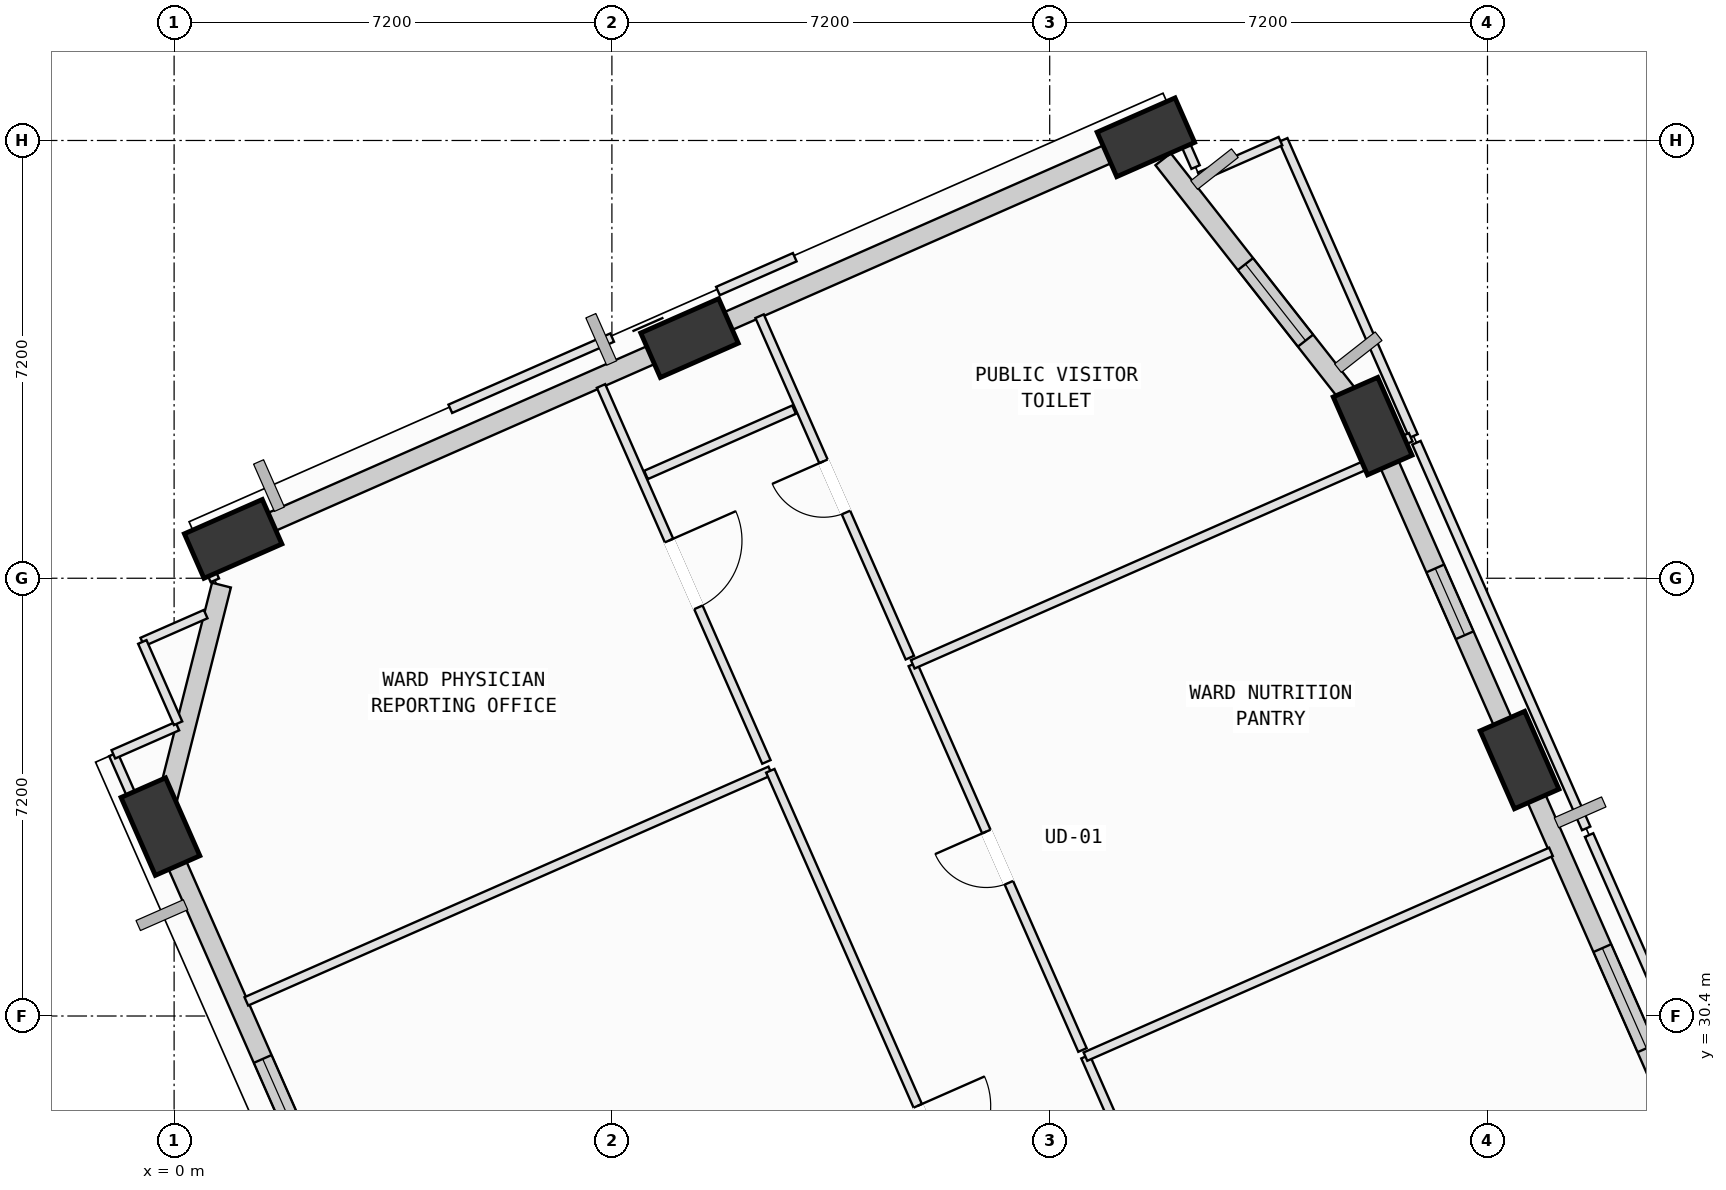
"""IFC4 building model, lengths in metres.
Left out: names, types, materials, properties, quantities, classifications, styles, units other than length and angle.
Written with IfcOpenShell. Run it as: python <this file> out.ifc"""

import sys

from ifc_helpers import new_model, si_unit, direction, frame, frame_2d, origin, origin_2d, place, context, subcontext, project, spatial, rectangle, extrude, element, fill, save


model = new_model("IFC4")
c1 = context("Model", 3, precision=1e-05, world=origin(), true_north=direction((0.0, 1.0)))
c2 = subcontext(c1, "Body", "Model", "MODEL_VIEW")
j1 = project(units=[si_unit("LENGTHUNIT", "METRE"), si_unit("PLANEANGLEUNIT", "RADIAN")], contexts=[c1])
p1 = place(None, origin())
s1 = spatial("IfcSite", under=j1, at=p1, CompositionType="ELEMENT")
p2 = place(p1, origin())
s2 = spatial("IfcBuilding", under=s1, at=p2, CompositionType="ELEMENT")
p3 = place(p2, frame((0.0, 0.0, 124.4)))
s3 = spatial("IfcBuildingStorey", under=s2, at=p3, CompositionType="ELEMENT", Elevation=124.4)
p4 = place(p3, frame((22.127, 34.61, 0.002), z_axis=(-0.040180454618, -0.047801936905, 0.998048348476), x_axis=(0.279502323425, 0.958442212202, 0.057157476053)))
e1 = element("IfcColumn", 1, at=p4, inside=s3, PredefinedType="COLUMN", context=c2, shape_type="SweptSolid", body=[
    extrude(rectangle(XDim=1.4, YDim=0.8, at=origin_2d()), origin(), (0.0, 0.0, 1.0), 4.004),
])
p5 = place(p3, frame((19.711, 40.102, 0.002), z_axis=(-0.0626943162, -0.057885723015, 0.996352681427), x_axis=(0.396835249314, 0.914560833815, 0.078104200608)))
e2 = element("IfcColumn", 2, at=p5, inside=s3, PredefinedType="COLUMN", context=c2, shape_type="SweptSolid", body=[
    extrude(rectangle(XDim=1.4, YDim=0.8, at=origin_2d()), origin(), (0.0, 0.0, 1.0), 4.011),
])
p6 = place(p3, frame((15.982, 44.853, 0.002), z_axis=(-0.082033174961, -0.073289446468, 0.993931192408), x_axis=(0.908341058248, -0.415877043565, 0.044303572491)))
e3 = element("IfcColumn", 3, at=p6, inside=s3, PredefinedType="COLUMN", context=c2, shape_type="SweptSolid", body=[
    extrude(rectangle(XDim=1.4, YDim=0.8, at=origin_2d()), origin(), (0.0, 0.0, 1.0), 4.021),
])
p7 = place(p3, frame((8.476, 41.55, 0.002), z_axis=(-0.068013636446, -0.103899619312, 0.992259549898), x_axis=(0.984695690067, -0.166952204506, 0.050013591895)))
e4 = element("IfcColumn", 4, at=p7, inside=s3, PredefinedType="COLUMN", context=c2, shape_type="SweptSolid", body=[
    extrude(rectangle(XDim=1.4, YDim=0.8, at=origin_2d()), origin(), (0.0, 0.0, 1.0), 4.028),
])
p8 = place(p3, frame((0.971, 38.247, 0.002), z_axis=(-0.05404001338, -0.134314216701, 0.989464182346), x_axis=(0.997904403468, 0.028051460291, 0.058308808203)))
e5 = element("IfcColumn", 5, at=p8, inside=s3, PredefinedType="COLUMN", context=c2, shape_type="SweptSolid", body=[
    extrude(rectangle(XDim=1.4, YDim=0.8, at=origin_2d()), origin(), (0.0, 0.0, 1.0), 4.039),
])
p9 = place(p3, frame((-0.225, 33.515, 0.002), z_axis=(-0.034643865826, -0.139059147293, 0.989677905237), x_axis=(-0.171816784218, 0.976356827789, 0.131172929718)))
e6 = element("IfcColumn", 6, at=p9, inside=s3, PredefinedType="COLUMN", context=c2, shape_type="SweptSolid", body=[
    extrude(rectangle(XDim=1.4, YDim=0.8, at=origin_2d()), origin(), (0.0, 0.0, 1.0), 4.038),
])
p10 = place(p3, frame((22.344, 34.117, 0.0), z_axis=(0.0, 0.0, 1.0), x_axis=(0.402732040275, -0.915317924951, 0.0)))
e7 = element("IfcWall", 7, at=p10, inside=s3, PredefinedType="SOLIDWALL", context=c2, shape_type="SweptSolid", body=[
    extrude(rectangle(XDim=6.223, YDim=0.32, at=frame_2d((3.111, 0.0))), origin(), (0.0, 0.0, 1.0), 3.165),
])
p11 = place(p10, frame((2.841, 0.0, 0.75)))
e8 = element("IfcOpeningElement", 8, at=p11, cuts=e7, PredefinedType="OPENING", context=c2, shape_type="SweptSolid", body=[
    extrude(rectangle(XDim=1.8, YDim=2.05, at=frame_2d((0.9, 1.025))), frame((0.0, 0.17, 0.0), z_axis=(0.0, -1.0, 0.0), x_axis=(1.0, 0.0, 0.0)), (0.0, 0.0, 1.0), 0.34),
])
p12 = place(p3, frame((19.922, 39.622, 0.0), z_axis=(0.0, 0.0, 1.0), x_axis=(0.402751582793, -0.915309326161, 0.0)))
e9 = element("IfcWall", 9, at=p12, inside=s3, PredefinedType="SOLIDWALL", context=c2, shape_type="SweptSolid", body=[
    extrude(rectangle(XDim=5.047, YDim=0.32, at=frame_2d((2.523, 0.0))), origin(), (0.0, 0.0, 1.0), 3.165),
])
p13 = place(p12, frame((2.033, 0.0, 0.75)))
e10 = element("IfcOpeningElement", 10, at=p13, cuts=e9, PredefinedType="OPENING", context=c2, shape_type="SweptSolid", body=[
    extrude(rectangle(XDim=1.2, YDim=1.75, at=frame_2d((0.6, 0.875))), frame((0.0, 0.17, 0.0), z_axis=(0.0, -1.0, 0.0), x_axis=(1.0, 0.0, 0.0)), (0.0, 0.0, 1.0), 0.34),
])
p14 = place(p3, frame((16.265, 44.492, 0.0), z_axis=(0.0, 0.0, 1.0), x_axis=(0.617487208396, -0.78658092239, 0.0)))
e11 = element("IfcWall", 11, at=p14, inside=s3, PredefinedType="SOLIDWALL", context=c2, shape_type="SweptSolid", body=[
    extrude(rectangle(XDim=5.128, YDim=0.32, at=frame_2d((2.564, 0.0))), origin(), (0.0, 0.0, 1.0), 3.165),
])
p15 = place(p14, frame((2.193, 0.0, 0.75)))
e12 = element("IfcOpeningElement", 12, at=p15, cuts=e11, PredefinedType="OPENING", context=c2, shape_type="SweptSolid", body=[
    extrude(rectangle(XDim=1.6, YDim=1.95, at=frame_2d((0.8, 0.975))), frame((0.0, 0.17, 0.0), z_axis=(0.0, -1.0, 0.0), x_axis=(1.0, 0.0, 0.0)), (0.0, 0.0, 1.0), 0.34),
])
p16 = place(p3, frame((8.721, 41.658, 0.0), z_axis=(0.0, 0.0, 1.0), x_axis=(0.915314534558, 0.402739745775, 0.0)))
e13 = element("IfcWall", 13, at=p16, inside=s3, PredefinedType="SOLIDWALL", context=c2, shape_type="SweptSolid", body=[
    extrude(rectangle(XDim=7.231, YDim=0.32, at=frame_2d((3.615, 0.0))), origin(), (0.0, 0.0, 1.0), 3.165),
])
p17 = place(p3, frame((1.193, 38.345, 0.0), z_axis=(0.0, 0.0, 1.0), x_axis=(0.915298195842, 0.402776877052, 0.0)))
e14 = element("IfcWall", 14, at=p17, inside=s3, PredefinedType="SOLIDWALL", context=c2, shape_type="SweptSolid", body=[
    extrude(rectangle(XDim=7.27, YDim=0.32, at=frame_2d((3.635, 0.0))), origin(), (0.0, 0.0, 1.0), 3.165),
])
p18 = place(p3, frame((-0.174, 33.716, 0.0), z_axis=(0.0, 0.0, 1.0), x_axis=(0.244927522187, 0.969541391007, 0.0)))
e15 = element("IfcWall", 15, at=p18, inside=s3, PredefinedType="SOLIDWALL", context=c2, shape_type="SweptSolid", body=[
    extrude(rectangle(XDim=3.889, YDim=0.32, at=frame_2d((1.945, 0.0))), origin(), (0.0, 0.0, 1.0), 3.165),
])
p19 = place(p3, frame((2.251, 27.888, 0.0), z_axis=(0.0, 0.0, 1.0), x_axis=(-0.402764109306, 0.915303814181, 0.0)))
e16 = element("IfcWall", 16, at=p19, inside=s3, PredefinedType="SOLIDWALL", context=c2, shape_type="SweptSolid", body=[
    extrude(rectangle(XDim=5.456, YDim=0.32, at=frame_2d((2.728, 0.0))), origin(), (0.0, 0.0, 1.0), 3.165),
])
p20 = place(p19, frame((0.773, 0.0, 0.75)))
e17 = element("IfcOpeningElement", 17, at=p20, cuts=e16, PredefinedType="OPENING", context=c2, shape_type="SweptSolid", body=[
    extrude(rectangle(XDim=1.2, YDim=1.75, at=frame_2d((0.6, 0.875))), frame((0.0, 0.17, 0.0), z_axis=(0.0, -1.0, 0.0), x_axis=(1.0, 0.0, 0.0)), (0.0, 0.0, 1.0), 0.34),
])
p21 = place(p3, frame((1.188, 30.641, 0.0), z_axis=(0.0, 0.0, 1.0), x_axis=(0.915293999978, 0.40278641189, 0.0)))
e18 = element("IfcWall", 18, at=p21, inside=s3, PredefinedType="PARTITIONING", context=c2, shape_type="SweptSolid", body=[
    extrude(rectangle(XDim=9.414, YDim=0.15, at=frame_2d((4.707, 0.0))), origin(), (0.0, 0.0, 1.0), 3.78),
])
p22 = place(p3, frame((9.805, 34.433, 0.0), z_axis=(0.0, 0.0, 1.0), x_axis=(0.402775689137, -0.915298718583, 0.0)))
e19 = element("IfcWall", 19, at=p22, inside=s3, PredefinedType="PARTITIONING", context=c2, shape_type="SweptSolid", body=[
    extrude(rectangle(XDim=13.241, YDim=0.15, at=frame_2d((6.62, 0.0))), origin(), (0.0, 0.0, 1.0), 2.965),
])
p23 = place(p22, frame((6.02, 0.0, 0.0)))
e20 = element("IfcOpeningElement", 20, at=p23, cuts=e19, PredefinedType="OPENING", context=c2, shape_type="SweptSolid", body=[
    extrude(rectangle(XDim=1.2, YDim=2.15, at=frame_2d((0.6, 1.075))), frame((0.0, 0.085, 0.0), z_axis=(0.0, -1.0, 0.0), x_axis=(1.0, 0.0, 0.0)), (0.0, 0.0, 1.0), 0.17),
])
p24 = place(p3, frame((-0.523, 36.552, 0.0), z_axis=(0.0, 0.0, 1.0), x_axis=(0.915466781899, 0.402393552681, 0.0)))
e21 = element("IfcWall", 21, at=p24, inside=s3, PredefinedType="PARTITIONING", context=c2, shape_type="SweptSolid", body=[
    extrude(rectangle(XDim=1.138, YDim=0.15, at=frame_2d((0.569, 0.0))), origin(), (0.0, 0.0, 1.0), 3.78),
])
p25 = place(p3, frame((0.67, 37.566, 0.0), z_axis=(0.0, 0.0, 1.0), x_axis=(-0.402702139946, 0.915331080256, 0.0)))
e22 = element("IfcWall", 22, at=p25, inside=s3, PredefinedType="PARTITIONING", context=c2, shape_type="SweptSolid", body=[
    extrude(rectangle(XDim=0.673, YDim=0.15, at=frame_2d((0.336, 0.0))), origin(), (0.0, 0.0, 1.0), 2.965),
])
p26 = place(p3, frame((0.399, 38.182, 0.0), z_axis=(0.0, 0.0, 1.0), x_axis=(0.915292309977, 0.402790252236, 0.0)))
e23 = element("IfcWall", 23, at=p26, inside=s3, PredefinedType="PARTITIONING", context=c2, shape_type="SweptSolid", body=[
    extrude(rectangle(XDim=0.792, YDim=0.15, at=frame_2d((0.396, 0.0))), origin(), (0.0, 0.0, 1.0), 3.78),
])
p27 = place(p3, frame((7.021, 40.762, 0.0), z_axis=(0.0, 0.0, 1.0), x_axis=(0.402678050721, -0.915341677991, 0.0)))
e24 = element("IfcWall", 24, at=p27, inside=s3, PredefinedType="PARTITIONING", context=c2, shape_type="SweptSolid", body=[
    extrude(rectangle(XDim=6.755, YDim=0.15, at=frame_2d((3.377, 0.0))), origin(), (0.0, 0.0, 1.0), 2.965),
])
p28 = place(p27, frame((2.777, 0.0, 0.0)))
e25 = element("IfcOpeningElement", 25, at=p28, cuts=e24, PredefinedType="OPENING", context=c2, shape_type="SweptSolid", body=[
    extrude(rectangle(XDim=1.2, YDim=2.15, at=frame_2d((0.6, 1.075))), frame((0.0, 0.085, 0.0), z_axis=(0.0, -1.0, 0.0), x_axis=(1.0, 0.0, 0.0)), (0.0, 0.0, 1.0), 0.17),
])
p29 = place(p3, frame((-0.156, 32.789, 0.0), z_axis=(0.0, 0.0, 1.0), x_axis=(-0.402898926932, 0.915244478092, 0.0)))
e26 = element("IfcWall", 26, at=p29, inside=s3, PredefinedType="PARTITIONING", context=c2, shape_type="SweptSolid", body=[
    extrude(rectangle(XDim=2.092, YDim=0.15, at=frame_2d((1.046, 0.0))), origin(), (0.0, 0.0, 1.0), 3.165),
])
p30 = place(p3, frame((-0.999, 34.704, 0.0), z_axis=(0.0, 0.0, 1.0), x_axis=(0.915311900217, 0.402745732841, 0.0)))
e27 = element("IfcWall", 27, at=p30, inside=s3, PredefinedType="PARTITIONING", context=c2, shape_type="SweptSolid", body=[
    extrude(rectangle(XDim=1.149, YDim=0.15, at=frame_2d((0.575, 0.0))), origin(), (0.0, 0.0, 1.0), 3.78),
])
p31 = place(p3, frame((0.065, 35.215, 0.0), z_axis=(0.0, 0.0, 1.0), x_axis=(-0.402536929089, 0.915403747381, 0.0)))
e28 = element("IfcWall", 28, at=p31, inside=s3, PredefinedType="PARTITIONING", context=c2, shape_type="SweptSolid", body=[
    extrude(rectangle(XDim=1.46, YDim=0.15, at=frame_2d((0.73, 0.0))), origin(), (0.0, 0.0, 1.0), 3.78),
])
p32 = place(p3, frame((18.914, 20.807, 0.0), z_axis=(0.0, 0.0, 1.0), x_axis=(-0.402653023247, 0.915352687695, 0.0)))
e29 = element("IfcWall", 29, at=p32, inside=s3, PredefinedType="PARTITIONING", context=c2, shape_type="SweptSolid", body=[
    extrude(rectangle(XDim=9.75, YDim=0.15, at=frame_2d((4.875, 0.0))), origin(), (0.0, 0.0, 1.0), 3.78),
])
p33 = place(p32, frame((4.275, 0.0, 0.0)))
e30 = element("IfcOpeningElement", 30, at=p33, cuts=e29, PredefinedType="OPENING", context=c2, shape_type="SweptSolid", body=[
    extrude(rectangle(XDim=1.2, YDim=2.15, at=frame_2d((0.6, 1.075))), frame((0.0, 0.085, 0.0), z_axis=(0.0, -1.0, 0.0), x_axis=(1.0, 0.0, 0.0)), (0.0, 0.0, 1.0), 0.17),
])
p34 = place(p3, frame((14.988, 29.732, 0.0), z_axis=(0.0, 0.0, 1.0), x_axis=(0.915336120767, 0.402690682806, 0.0)))
e31 = element("IfcWall", 31, at=p34, inside=s3, PredefinedType="PARTITIONING", context=c2, shape_type="SweptSolid", body=[
    extrude(rectangle(XDim=8.364, YDim=0.15, at=frame_2d((4.182, 0.0))), origin(), (0.0, 0.0, 1.0), 3.78),
])
p35 = place(p3, frame((23.271, 33.376, 0.0), z_axis=(0.0, 0.0, 1.0), x_axis=(0.402773858413, -0.915299524188, 0.0)))
e32 = element("IfcWall", 32, at=p35, inside=s3, PredefinedType="PARTITIONING", context=c2, shape_type="SweptSolid", body=[
    extrude(rectangle(XDim=9.75, YDim=0.15, at=frame_2d((4.875, 0.0))), origin(), (0.0, 0.0, 1.0), 3.78),
])
p36 = place(p3, frame((14.939, 29.841, 0.0), z_axis=(0.0, 0.0, 1.0), x_axis=(-0.402749239906, 0.915310357068, 0.0)))
e33 = element("IfcWall", 33, at=p36, inside=s3, PredefinedType="PARTITIONING", context=c2, shape_type="SweptSolid", body=[
    extrude(rectangle(XDim=6.93, YDim=0.15, at=frame_2d((3.465, 0.0))), origin(), (0.0, 0.0, 1.0), 3.78),
])
p37 = place(p36, frame((3.005, 0.0, 0.0)))
e34 = element("IfcOpeningElement", 34, at=p37, cuts=e33, PredefinedType="OPENING", context=c2, shape_type="SweptSolid", body=[
    extrude(rectangle(XDim=0.92, YDim=2.1, at=frame_2d((0.46, 1.05))), frame((0.0, 0.085, 0.0), z_axis=(0.0, -1.0, 0.0), x_axis=(1.0, 0.0, 0.0)), (0.0, 0.0, 1.0), 0.17),
])
p38 = place(p3, frame((12.148, 36.184, 0.0), z_axis=(0.0, 0.0, 1.0), x_axis=(0.915322778352, 0.402721009421, 0.0)))
e35 = element("IfcWall", 35, at=p38, inside=s3, PredefinedType="PARTITIONING", context=c2, shape_type="SweptSolid", body=[
    extrude(rectangle(XDim=8.365, YDim=0.15, at=frame_2d((4.183, 0.0))), origin(), (0.0, 0.0, 1.0), 3.78),
])
p39 = place(p3, frame((20.432, 39.829, 0.0), z_axis=(0.0, 0.0, 1.0), x_axis=(0.402749239906, -0.915310357068, 0.0)))
e36 = element("IfcWall", 36, at=p39, inside=s3, PredefinedType="PARTITIONING", context=c2, shape_type="SweptSolid", body=[
    extrude(rectangle(XDim=6.93, YDim=0.15, at=frame_2d((3.465, 0.0))), origin(), (0.0, 0.0, 1.0), 3.78),
])
p40 = place(p3, frame((18.241, 44.809, 0.0), z_axis=(0.0, 0.0, 1.0), x_axis=(0.402618663072, -0.915367801567, 0.0)))
e37 = element("IfcWall", 37, at=p40, inside=s3, PredefinedType="PARTITIONING", context=c2, shape_type="SweptSolid", body=[
    extrude(rectangle(XDim=5.32, YDim=0.15, at=frame_2d((2.66, 0.0))), origin(), (0.0, 0.0, 1.0), 3.78),
])
p41 = place(p3, frame((20.337, 39.919, 0.0), z_axis=(0.0, 0.0, 1.0), x_axis=(-0.915071434619, -0.403291792062, 0.0)))
e38 = element("IfcWall", 38, at=p41, inside=s3, PredefinedType="PARTITIONING", context=c2, shape_type="SweptSolid", body=[
    extrude(rectangle(XDim=0.414, YDim=0.15, at=frame_2d((0.207, 0.0))), origin(), (0.0, 0.0, 1.0), 3.78),
])
p42 = place(p3, frame((12.1, 36.294, 0.0), z_axis=(0.0, 0.0, 1.0), x_axis=(-0.402761283097, 0.915305057802, 0.0)))
e39 = element("IfcWall", 39, at=p42, inside=s3, PredefinedType="PARTITIONING", context=c2, shape_type="SweptSolid", body=[
    extrude(rectangle(XDim=6.136, YDim=0.15, at=frame_2d((3.068, 0.0))), origin(), (0.0, 0.0, 1.0), 3.78),
])
p43 = place(p42, frame((2.608, 0.0, 0.0)))
e40 = element("IfcOpeningElement", 40, at=p43, cuts=e39, PredefinedType="OPENING", context=c2, shape_type="SweptSolid", body=[
    extrude(rectangle(XDim=0.92, YDim=2.1, at=frame_2d((0.46, 1.05))), frame((0.0, 0.085, 0.0), z_axis=(0.0, -1.0, 0.0), x_axis=(1.0, 0.0, 0.0)), (0.0, 0.0, 1.0), 0.17),
])
p44 = place(p3, frame((15.263, 44.744, 0.0), z_axis=(0.0, 0.0, 1.0), x_axis=(0.915340908858, 0.402679799061, 0.0)))
e41 = element("IfcWall", 41, at=p44, inside=s3, PredefinedType="PARTITIONING", context=c2, shape_type="SweptSolid", body=[
    extrude(rectangle(XDim=1.252, YDim=0.15, at=frame_2d((0.626, 0.0))), origin(), (0.0, 0.0, 1.0), 3.165),
])
p45 = place(p3, frame((16.429, 45.202, 0.0), z_axis=(0.0, 0.0, 1.0), x_axis=(0.403666428582, -0.914906232592, 0.0)))
e42 = element("IfcWall", 42, at=p45, inside=s3, PredefinedType="PARTITIONING", context=c2, shape_type="SweptSolid", body=[
    extrude(rectangle(XDim=0.917, YDim=0.15, at=frame_2d((0.458, 0.0))), origin(), (0.0, 0.0, 1.0), 3.78),
])
p46 = place(p3, frame((16.868, 44.205, 0.0), z_axis=(0.0, 0.0, 1.0), x_axis=(0.915305100978, 0.402761184978, 0.0)))
e43 = element("IfcWall", 43, at=p46, inside=s3, PredefinedType="PARTITIONING", context=c2, shape_type="SweptSolid", body=[
    extrude(rectangle(XDim=1.45, YDim=0.15, at=frame_2d((0.725, 0.0))), origin(), (0.0, 0.0, 1.0), 3.78),
])
p47 = place(p3, frame((4.542, 40.387, 0.0), z_axis=(0.0, 0.0, 1.0), x_axis=(0.915338549024, 0.402685163212, 0.0)))
e44 = element("IfcWall", 44, at=p47, inside=s3, PredefinedType="PARTITIONING", context=c2, shape_type="SweptSolid", body=[
    extrude(rectangle(XDim=2.908, YDim=0.15, at=frame_2d((1.454, 0.0))), origin(), (0.0, 0.0, 1.0), 3.78),
])
p48 = place(p3, frame((8.944, 42.324, 0.0), z_axis=(0.0, 0.0, 1.0), x_axis=(0.915257627684, 0.402869054366, 0.0)))
e45 = element("IfcWall", 45, at=p48, inside=s3, PredefinedType="PARTITIONING", context=c2, shape_type="SweptSolid", body=[
    extrude(rectangle(XDim=1.38, YDim=0.15, at=frame_2d((0.69, 0.0))), origin(), (0.0, 0.0, 1.0), 3.78),
])
p49 = place(p3, frame((10.196, 40.373, 0.0), z_axis=(0.0, 0.0, 1.0), x_axis=(-0.914961637512, -0.403540830501, 0.0)))
e46 = element("IfcWall", 46, at=p49, inside=s3, PredefinedType="PARTITIONING", context=c2, shape_type="SweptSolid", body=[
    extrude(rectangle(XDim=2.661, YDim=0.15, at=frame_2d((1.331, 0.0))), origin(), (0.0, 0.0, 1.0), 3.78),
])
p50 = place(p11, origin())
e47 = element("IfcWindow", 47, at=p50, inside=s3, PartitioningType="SINGLE_PANEL", PredefinedType="WINDOW", context=c2, shape_type="SweptSolid", body=[
    extrude(rectangle(XDim=1.8, YDim=2.05, at=frame_2d((0.9, 1.025))), frame((0.0, 0.03, 0.0), z_axis=(0.0, -1.0, 0.0), x_axis=(1.0, 0.0, 0.0)), (0.0, 0.0, 1.0), 0.06),
])
fill(e8, e47)
p51 = place(p13, origin())
e48 = element("IfcWindow", 48, at=p51, inside=s3, PartitioningType="SINGLE_PANEL", PredefinedType="WINDOW", context=c2, shape_type="SweptSolid", body=[
    extrude(rectangle(XDim=1.2, YDim=1.75, at=frame_2d((0.6, 0.875))), frame((0.0, 0.03, 0.0), z_axis=(0.0, -1.0, 0.0), x_axis=(1.0, 0.0, 0.0)), (0.0, 0.0, 1.0), 0.06),
])
fill(e10, e48)
p52 = place(p15, origin())
e49 = element("IfcWindow", 49, at=p52, inside=s3, PartitioningType="SINGLE_PANEL", PredefinedType="WINDOW", context=c2, shape_type="SweptSolid", body=[
    extrude(rectangle(XDim=1.6, YDim=1.95, at=frame_2d((0.8, 0.975))), frame((0.0, 0.03, 0.0), z_axis=(0.0, -1.0, 0.0), x_axis=(1.0, 0.0, 0.0)), (0.0, 0.0, 1.0), 0.06),
])
fill(e12, e49)
p53 = place(p20, origin())
e50 = element("IfcWindow", 50, at=p53, inside=s3, PartitioningType="SINGLE_PANEL", PredefinedType="WINDOW", context=c2, shape_type="SweptSolid", body=[
    extrude(rectangle(XDim=1.2, YDim=1.75, at=frame_2d((0.6, 0.875))), frame((0.0, 0.03, 0.0), z_axis=(0.0, -1.0, 0.0), x_axis=(1.0, 0.0, 0.0)), (0.0, 0.0, 1.0), 0.06),
])
fill(e17, e50)
p54 = place(p23, origin())
e51 = element("IfcDoor", 51, at=p54, inside=s3, OperationType="SINGLE_SWING_LEFT", PredefinedType="DOOR", context=c2, shape_type="SweptSolid", body=[
    extrude(rectangle(XDim=1.2, YDim=2.15, at=frame_2d((0.6, 1.075))), frame((0.0, 0.025, 0.0), z_axis=(0.0, -1.0, 0.0), x_axis=(1.0, 0.0, 0.0)), (0.0, 0.0, 1.0), 0.05),
])
fill(e20, e51)
p55 = place(p28, origin())
e52 = element("IfcDoor", 52, at=p55, inside=s3, OperationType="SINGLE_SWING_LEFT", PredefinedType="DOOR", context=c2, shape_type="SweptSolid", body=[
    extrude(rectangle(XDim=1.2, YDim=2.15, at=frame_2d((0.6, 1.075))), frame((0.0, 0.025, 0.0), z_axis=(0.0, -1.0, 0.0), x_axis=(1.0, 0.0, 0.0)), (0.0, 0.0, 1.0), 0.05),
])
fill(e25, e52)
p56 = place(p37, origin())
e53 = element("IfcDoor", 53, at=p56, inside=s3, OperationType="SINGLE_SWING_RIGHT", PredefinedType="DOOR", context=c2, shape_type="SweptSolid", body=[
    extrude(rectangle(XDim=0.92, YDim=2.1, at=frame_2d((0.46, 1.05))), frame((0.0, 0.025, 0.0), z_axis=(0.0, -1.0, 0.0), x_axis=(1.0, 0.0, 0.0)), (0.0, 0.0, 1.0), 0.05),
])
fill(e34, e53)
p57 = place(p43, origin())
e54 = element("IfcDoor", 54, at=p57, inside=s3, OperationType="SINGLE_SWING_RIGHT", PredefinedType="DOOR", context=c2, shape_type="SweptSolid", body=[
    extrude(rectangle(XDim=0.92, YDim=2.1, at=frame_2d((0.46, 1.05))), frame((0.0, 0.025, 0.0), z_axis=(0.0, -1.0, 0.0), x_axis=(1.0, 0.0, 0.0)), (0.0, 0.0, 1.0), 0.05),
])
fill(e40, e54)
save(model, sys.argv[1])
